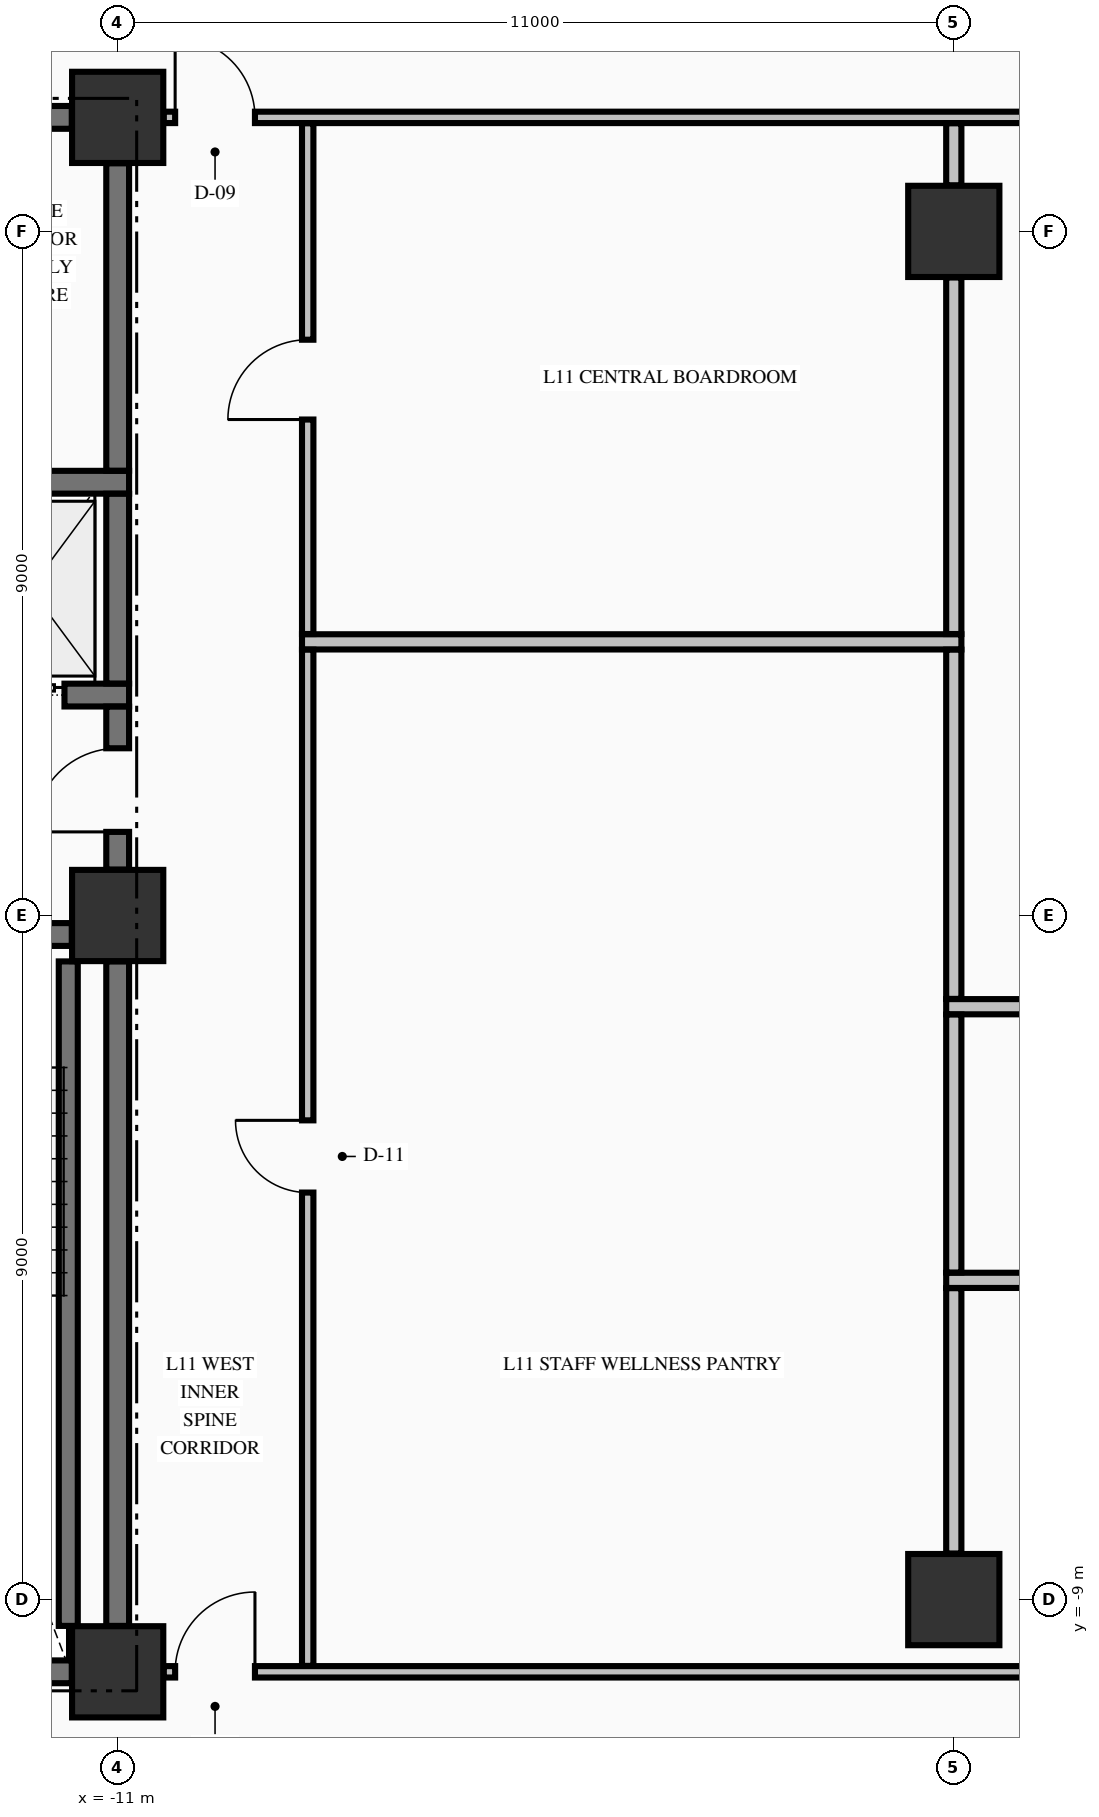
"""IFC4 building model, lengths in metres.
Left out: names, types, materials, properties, quantities, classifications, styles, units other than length and angle.
Written with IfcOpenShell. Run it as: python <this file> out.ifc"""

import sys

from ifc_helpers import new_model, si_unit, direction, frame, frame_2d, origin, origin_2d, place, context, subcontext, project, spatial, rectangle, extrude, element, fill, save


model = new_model("IFC4")
c1 = context("Model", 3, precision=1e-05, world=origin(), true_north=direction((0.0, 1.0)))
c2 = subcontext(c1, "Body", "Model", "MODEL_VIEW")
j1 = project(units=[si_unit("LENGTHUNIT", "METRE"), si_unit("PLANEANGLEUNIT", "RADIAN")], contexts=[c1])
p1 = place(None, origin())
s1 = spatial("IfcSite", under=j1, at=p1, CompositionType="ELEMENT")
p2 = place(p1, origin())
s2 = spatial("IfcBuilding", under=s1, at=p2, CompositionType="ELEMENT")
p3 = place(p2, frame((0.0, 0.0, 48.62)))
s3 = spatial("IfcBuildingStorey", under=s2, at=p3, CompositionType="ELEMENT", Elevation=48.62)
for number, where, z_axis, x_axis in (
    (1, (-11.0, -9.95, -0.25), (0.0, 0.0, 1.0), (1.0, 0.0, 0.0)),
    (2, (-11.0, 0.0, -0.25), (0.0, 0.0, 1.0), (1.0, 0.0, 0.0)),
    (3, (-11.0, 10.5, -0.25), (0.0, 0.0, 1.0), (1.0, 0.0, 0.0)),
    (4, (0.0, -9.0, -0.25), (0.0, 0.0, 1.0), (1.0, 0.0, 0.0)),
    (5, (0.0, 9.0, -0.25), (0.0, 0.0, 1.0), (1.0, 0.0, 0.0)),
):
    element("IfcColumn", number, at=place(p3, frame(where, z_axis=z_axis, x_axis=x_axis)), inside=s3, PredefinedType="COLUMN", context=c2, shape_type="SweptSolid", body=[
        extrude(rectangle(XDim=1.2, YDim=1.2, at=origin_2d()), origin(), (0.0, 0.0, 1.0), 3.395),
    ])
p4 = place(p3, frame((-14.7, -9.95, 0.0), z_axis=(0.0, 0.0, 1.0), x_axis=(1.0, 0.0, 0.0)))
e6 = element("IfcWall", 6, at=p4, inside=s3, PredefinedType="SHEAR", context=c2, shape_type="SweptSolid", body=[
    extrude(rectangle(XDim=3.096, YDim=0.3, at=frame_2d((1.548, 0.0))), origin(), (0.0, 0.0, 1.0), 3.145),
])
p5 = place(p3, frame((-19.396, -0.25, 0.0), z_axis=(0.0, 0.0, 1.0), x_axis=(1.0, 0.0, 0.0)))
e7 = element("IfcWall", 7, at=p5, inside=s3, PredefinedType="SHEAR", context=c2, shape_type="SweptSolid", body=[
    extrude(rectangle(XDim=7.792, YDim=0.3, at=frame_2d((3.896, 0.0))), origin(), (0.0, 0.0, 1.0), 3.145),
])
p6 = place(p5, frame((5.696, 0.0, 0.0)))
e8 = element("IfcOpeningElement", 8, at=p6, cuts=e7, PredefinedType="OPENING", context=c2, shape_type="SweptSolid", body=[
    extrude(rectangle(XDim=1.1, YDim=2.15, at=frame_2d((0.55, 1.075))), frame((0.0, 0.16, 0.0), z_axis=(0.0, -1.0, 0.0), x_axis=(1.0, 0.0, 0.0)), (0.0, 0.0, 1.0), 0.32),
])
p7 = place(p3, frame((-14.875, 2.9, 0.0), z_axis=(0.0, 0.0, 1.0), x_axis=(1.0, 0.0, 0.0)))
e9 = element("IfcWall", 9, at=p7, inside=s3, PredefinedType="SHEAR", context=c2, shape_type="SweptSolid", body=[
    extrude(rectangle(XDim=4.025, YDim=0.3, at=frame_2d((2.012, 0.0))), origin(), (0.0, 0.0, 1.0), 3.145),
])
p8 = place(p7, frame((2.075, 0.0, 0.0)))
e10 = element("IfcOpeningElement", 10, at=p8, cuts=e9, PredefinedType="OPENING", context=c2, shape_type="SweptSolid", body=[
    extrude(rectangle(XDim=1.1, YDim=2.2, at=frame_2d((0.55, 1.1))), frame((0.0, 0.16, 0.0), z_axis=(0.0, -1.0, 0.0), x_axis=(1.0, 0.0, 0.0)), (0.0, 0.0, 1.0), 0.32),
])
p9 = place(p3, frame((-14.875, 5.7, 0.0), z_axis=(0.0, 0.0, 1.0), x_axis=(1.0, 0.0, 0.0)))
e11 = element("IfcWall", 11, at=p9, inside=s3, PredefinedType="SHEAR", context=c2, shape_type="SweptSolid", body=[
    extrude(rectangle(XDim=4.025, YDim=0.3, at=frame_2d((2.012, 0.0))), origin(), (0.0, 0.0, 1.0), 3.145),
])
p10 = place(p3, frame((-14.7, 10.5, 0.0), z_axis=(0.0, 0.0, 1.0), x_axis=(1.0, 0.0, 0.0)))
e12 = element("IfcWall", 12, at=p10, inside=s3, PredefinedType="SHEAR", context=c2, shape_type="SweptSolid", body=[
    extrude(rectangle(XDim=3.096, YDim=0.3, at=frame_2d((1.548, 0.0))), origin(), (0.0, 0.0, 1.0), 3.145),
])
p11 = place(p10, frame((0.245, 0.0, 0.0)))
e13 = element("IfcOpeningElement", 13, at=p11, cuts=e12, PredefinedType="OPENING", context=c2, shape_type="SweptSolid", body=[
    extrude(rectangle(XDim=0.95, YDim=2.15, at=frame_2d((0.475, 1.075))), frame((0.0, 0.16, 0.0), z_axis=(0.0, -1.0, 0.0), x_axis=(1.0, 0.0, 0.0)), (0.0, 0.0, 1.0), 0.32),
])
p12 = place(p3, frame((-10.394, -9.95, 0.0), z_axis=(0.0, 0.0, 1.0), x_axis=(1.0, 0.0, 0.0)))
e14 = element("IfcWall", 14, at=p12, inside=s3, PredefinedType="PARTITIONING", context=c2, shape_type="SweptSolid", body=[
    extrude(rectangle(XDim=20.788, YDim=0.15, at=frame_2d((10.394, 0.0))), origin(), (0.0, 0.0, 1.0), 3.145),
])
p13 = place(p12, frame((0.15, 0.0, 0.0)))
e15 = element("IfcOpeningElement", 15, at=p13, cuts=e14, PredefinedType="OPENING", context=c2, shape_type="SweptSolid", body=[
    extrude(rectangle(XDim=1.05, YDim=2.15, at=frame_2d((0.525, 1.075))), frame((0.0, 0.085, 0.0), z_axis=(0.0, -1.0, 0.0), x_axis=(1.0, 0.0, 0.0)), (0.0, 0.0, 1.0), 0.17),
])
p14 = place(p12, frame((19.588, 0.0, 0.0)))
e16 = element("IfcOpeningElement", 16, at=p14, cuts=e14, PredefinedType="OPENING", context=c2, shape_type="SweptSolid", body=[
    extrude(rectangle(XDim=1.05, YDim=2.15, at=frame_2d((0.525, 1.075))), frame((0.0, 0.085, 0.0), z_axis=(0.0, -1.0, 0.0), x_axis=(1.0, 0.0, 0.0)), (0.0, 0.0, 1.0), 0.17),
])
p15 = place(p12, frame((12.669, 0.0, 0.0)))
e17 = element("IfcOpeningElement", 17, at=p15, cuts=e14, PredefinedType="OPENING", context=c2, shape_type="SweptSolid", body=[
    extrude(rectangle(XDim=0.95, YDim=2.15, at=frame_2d((0.475, 1.075))), frame((0.0, 0.085, 0.0), z_axis=(0.0, -1.0, 0.0), x_axis=(1.0, 0.0, 0.0)), (0.0, 0.0, 1.0), 0.17),
])
for number, where, z_axis, x_axis in (
    (18, (-0.1, -4.8, 0.0), (0.0, 0.0, 1.0), (1.0, 0.0, 0.0)),
    (19, (-0.1, -1.2, 0.0), (0.0, 0.0, 1.0), (1.0, 0.0, 0.0)),
    (20, (-8.575, 3.6, 0.0), (0.0, 0.0, 1.0), (1.0, 0.0, 0.0)),
):
    element("IfcWall", number, at=place(p3, frame(where, z_axis=z_axis, x_axis=x_axis)), inside=s3, PredefinedType="PARTITIONING", context=c2, shape_type="SweptSolid", body=[
        extrude(rectangle(XDim=8.675, YDim=0.2, at=frame_2d((4.337, 0.0))), origin(), (0.0, 0.0, 1.0), 3.145),
    ])
p16 = place(p3, frame((-10.394, 10.5, 0.0), z_axis=(0.0, 0.0, 1.0), x_axis=(1.0, 0.0, 0.0)))
e21 = element("IfcWall", 21, at=p16, inside=s3, PredefinedType="PARTITIONING", context=c2, shape_type="SweptSolid", body=[
    extrude(rectangle(XDim=20.788, YDim=0.15, at=frame_2d((10.394, 0.0))), origin(), (0.0, 0.0, 1.0), 3.145),
])
p17 = place(p16, frame((0.15, 0.0, 0.0)))
e22 = element("IfcOpeningElement", 22, at=p17, cuts=e21, PredefinedType="OPENING", context=c2, shape_type="SweptSolid", body=[
    extrude(rectangle(XDim=1.05, YDim=2.15, at=frame_2d((0.525, 1.075))), frame((0.0, 0.085, 0.0), z_axis=(0.0, -1.0, 0.0), x_axis=(1.0, 0.0, 0.0)), (0.0, 0.0, 1.0), 0.17),
])
p18 = place(p16, frame((19.588, 0.0, 0.0)))
e23 = element("IfcOpeningElement", 23, at=p18, cuts=e21, PredefinedType="OPENING", context=c2, shape_type="SweptSolid", body=[
    extrude(rectangle(XDim=1.05, YDim=2.15, at=frame_2d((0.525, 1.075))), frame((0.0, 0.085, 0.0), z_axis=(0.0, -1.0, 0.0), x_axis=(1.0, 0.0, 0.0)), (0.0, 0.0, 1.0), 0.17),
])
p19 = place(p3, frame((-11.65, -9.346, 0.0), z_axis=(0.0, 0.0, 1.0), x_axis=(0.0, 1.0, 0.0)))
e24 = element("IfcWall", 24, at=p19, inside=s3, PredefinedType="SOLIDWALL", context=c2, shape_type="SweptSolid", body=[
    extrude(rectangle(XDim=8.742, YDim=0.25, at=frame_2d((4.371, 0.0))), origin(), (0.0, 0.0, 1.0), 3.145),
])
p20 = place(p3, frame((-11.0, -9.346, 0.0), z_axis=(0.0, 0.0, 1.0), x_axis=(0.0, 1.0, 0.0)))
e25 = element("IfcWall", 25, at=p20, inside=s3, PredefinedType="SHEAR", context=c2, shape_type="SweptSolid", body=[
    extrude(rectangle(XDim=8.742, YDim=0.3, at=frame_2d((4.371, 0.0))), origin(), (0.0, 0.0, 1.0), 3.145),
])
p21 = place(p3, frame((-11.0, 0.604, 0.0), z_axis=(0.0, 0.0, 1.0), x_axis=(0.0, 1.0, 0.0)))
e26 = element("IfcWall", 26, at=p21, inside=s3, PredefinedType="SHEAR", context=c2, shape_type="SweptSolid", body=[
    extrude(rectangle(XDim=2.144, YDim=0.3, at=frame_2d((1.072, 0.0))), origin(), (0.0, 0.0, 1.0), 3.145),
])
p22 = place(p21, frame((0.496, 0.0, 0.0)))
e27 = element("IfcOpeningElement", 27, at=p22, cuts=e26, PredefinedType="OPENING", context=c2, shape_type="SweptSolid", body=[
    extrude(rectangle(XDim=1.1, YDim=2.15, at=frame_2d((0.55, 1.075))), frame((0.0, 0.16, 0.0), z_axis=(0.0, -1.0, 0.0), x_axis=(1.0, 0.0, 0.0)), (0.0, 0.0, 1.0), 0.32),
])
p23 = place(p3, frame((-11.0, 3.052, 0.0), z_axis=(0.0, 0.0, 1.0), x_axis=(0.0, 1.0, 0.0)))
e28 = element("IfcWall", 28, at=p23, inside=s3, PredefinedType="SHEAR", context=c2, shape_type="SweptSolid", body=[
    extrude(rectangle(XDim=2.496, YDim=0.3, at=frame_2d((1.248, 0.0))), origin(), (0.0, 0.0, 1.0), 3.145),
])
p24 = place(p3, frame((-11.0, 5.852, 0.0), z_axis=(0.0, 0.0, 1.0), x_axis=(0.0, 1.0, 0.0)))
e29 = element("IfcWall", 29, at=p24, inside=s3, PredefinedType="SHEAR", context=c2, shape_type="SweptSolid", body=[
    extrude(rectangle(XDim=4.044, YDim=0.3, at=frame_2d((2.022, 0.0))), origin(), (0.0, 0.0, 1.0), 3.145),
])
p25 = place(p3, frame((-8.5, -9.872, 0.0), z_axis=(0.0, 0.0, 1.0), x_axis=(0.0, 1.0, 0.0)))
e30 = element("IfcWall", 30, at=p25, inside=s3, PredefinedType="PARTITIONING", context=c2, shape_type="SweptSolid", body=[
    extrude(rectangle(XDim=13.369, YDim=0.15, at=frame_2d((6.685, 0.0))), origin(), (0.0, 0.0, 1.0), 3.145),
])
p26 = place(p25, frame((6.227, 0.0, 0.0)))
e31 = element("IfcOpeningElement", 31, at=p26, cuts=e30, PredefinedType="OPENING", context=c2, shape_type="SweptSolid", body=[
    extrude(rectangle(XDim=0.95, YDim=2.15, at=frame_2d((0.475, 1.075))), frame((0.0, 0.085, 0.0), z_axis=(0.0, -1.0, 0.0), x_axis=(1.0, 0.0, 0.0)), (0.0, 0.0, 1.0), 0.17),
])
p27 = place(p3, frame((-8.5, 3.703, 0.0), z_axis=(0.0, 0.0, 1.0), x_axis=(0.0, 1.0, 0.0)))
e32 = element("IfcWall", 32, at=p27, inside=s3, PredefinedType="PARTITIONING", context=c2, shape_type="SweptSolid", body=[
    extrude(rectangle(XDim=6.719, YDim=0.15, at=frame_2d((3.36, 0.0))), origin(), (0.0, 0.0, 1.0), 3.145),
])
p28 = place(p27, frame((2.822, 0.0, 0.0)))
e33 = element("IfcOpeningElement", 33, at=p28, cuts=e32, PredefinedType="OPENING", context=c2, shape_type="SweptSolid", body=[
    extrude(rectangle(XDim=1.05, YDim=2.15, at=frame_2d((0.525, 1.075))), frame((0.0, 0.085, 0.0), z_axis=(0.0, -1.0, 0.0), x_axis=(1.0, 0.0, 0.0)), (0.0, 0.0, 1.0), 0.17),
])
p29 = place(p3, frame((0.0, -8.394, 0.0), z_axis=(0.0, 0.0, 1.0), x_axis=(0.0, 1.0, 0.0)))
e34 = element("IfcWall", 34, at=p29, inside=s3, PredefinedType="PARTITIONING", context=c2, shape_type="SweptSolid", body=[
    extrude(rectangle(XDim=3.491, YDim=0.2, at=frame_2d((1.746, 0.0))), origin(), (0.0, 0.0, 1.0), 2.485),
])
p30 = place(p3, frame((0.0, -4.697, 0.0), z_axis=(0.0, 0.0, 1.0), x_axis=(0.0, 1.0, 0.0)))
e35 = element("IfcWall", 35, at=p30, inside=s3, PredefinedType="PARTITIONING", context=c2, shape_type="SweptSolid", body=[
    extrude(rectangle(XDim=3.394, YDim=0.2, at=frame_2d((1.697, 0.0))), origin(), (0.0, 0.0, 1.0), 2.485),
])
p31 = place(p3, frame((0.0, -1.097, 0.0), z_axis=(0.0, 0.0, 1.0), x_axis=(0.0, 1.0, 0.0)))
e36 = element("IfcWall", 36, at=p31, inside=s3, PredefinedType="PARTITIONING", context=c2, shape_type="SweptSolid", body=[
    extrude(rectangle(XDim=4.594, YDim=0.2, at=frame_2d((2.297, 0.0))), origin(), (0.0, 0.0, 1.0), 2.485),
])
p32 = place(p3, frame((0.0, 3.703, 0.0), z_axis=(0.0, 0.0, 1.0), x_axis=(0.0, 1.0, 0.0)))
e37 = element("IfcWall", 37, at=p32, inside=s3, PredefinedType="PARTITIONING", context=c2, shape_type="SweptSolid", body=[
    extrude(rectangle(XDim=4.691, YDim=0.2, at=frame_2d((2.346, 0.0))), origin(), (0.0, 0.0, 1.0), 2.485),
])
p33 = place(p3, frame((0.0, 9.606, 0.0), z_axis=(0.0, 0.0, 1.0), x_axis=(0.0, 1.0, 0.0)))
e38 = element("IfcWall", 38, at=p33, inside=s3, PredefinedType="PARTITIONING", context=c2, shape_type="SweptSolid", body=[
    extrude(rectangle(XDim=0.816, YDim=0.2, at=frame_2d((0.408, 0.0))), origin(), (0.0, 0.0, 1.0), 2.485),
])
p34 = place(p22, origin())
e39 = element("IfcDoor", 39, at=p34, inside=s3, OperationType="SINGLE_SWING_LEFT", PredefinedType="DOOR", context=c2, shape_type="SweptSolid", body=[
    extrude(rectangle(XDim=1.1, YDim=2.15, at=frame_2d((0.55, 1.075))), frame((0.0, 0.025, 0.0), z_axis=(0.0, -1.0, 0.0), x_axis=(1.0, 0.0, 0.0)), (0.0, 0.0, 1.0), 0.05),
])
fill(e27, e39)
p35 = place(p8, origin())
e40 = element("IfcDoor", 40, at=p35, inside=s3, OperationType="SLIDING_TO_LEFT", PredefinedType="DOOR", context=c2, shape_type="SweptSolid", body=[
    extrude(rectangle(XDim=1.1, YDim=2.2, at=frame_2d((0.55, 1.1))), frame((0.0, 0.025, 0.0), z_axis=(0.0, -1.0, 0.0), x_axis=(1.0, 0.0, 0.0)), (0.0, 0.0, 1.0), 0.05),
])
fill(e10, e40)
p36 = place(p17, origin())
e41 = element("IfcDoor", 41, at=p36, inside=s3, OperationType="SINGLE_SWING_LEFT", PredefinedType="DOOR", context=c2, shape_type="SweptSolid", body=[
    extrude(rectangle(XDim=1.05, YDim=2.15, at=frame_2d((0.525, 1.075))), frame((0.0, 0.025, 0.0), z_axis=(0.0, -1.0, 0.0), x_axis=(1.0, 0.0, 0.0)), (0.0, 0.0, 1.0), 0.05),
])
fill(e22, e41)
p37 = place(p13, origin())
e42 = element("IfcDoor", 42, at=p37, inside=s3, OperationType="SINGLE_SWING_RIGHT", PredefinedType="DOOR", context=c2, shape_type="SweptSolid", body=[
    extrude(rectangle(XDim=1.05, YDim=2.15, at=frame_2d((0.525, 1.075))), frame((0.0, 0.025, 0.0), z_axis=(0.0, -1.0, 0.0), x_axis=(1.0, 0.0, 0.0)), (0.0, 0.0, 1.0), 0.05),
])
fill(e15, e42)
p38 = place(p28, origin())
e43 = element("IfcDoor", 43, at=p38, inside=s3, OperationType="SINGLE_SWING_LEFT", PredefinedType="DOOR", context=c2, shape_type="SweptSolid", body=[
    extrude(rectangle(XDim=1.05, YDim=2.15, at=frame_2d((0.525, 1.075))), frame((0.0, 0.025, 0.0), z_axis=(0.0, -1.0, 0.0), x_axis=(1.0, 0.0, 0.0)), (0.0, 0.0, 1.0), 0.05),
])
fill(e33, e43)
p39 = place(p26, origin())
e44 = element("IfcDoor", 44, at=p39, inside=s3, OperationType="SINGLE_SWING_RIGHT", PredefinedType="DOOR", context=c2, shape_type="SweptSolid", body=[
    extrude(rectangle(XDim=0.95, YDim=2.15, at=frame_2d((0.475, 1.075))), frame((0.0, 0.025, 0.0), z_axis=(0.0, -1.0, 0.0), x_axis=(1.0, 0.0, 0.0)), (0.0, 0.0, 1.0), 0.05),
])
fill(e31, e44)
save(model, sys.argv[1])
